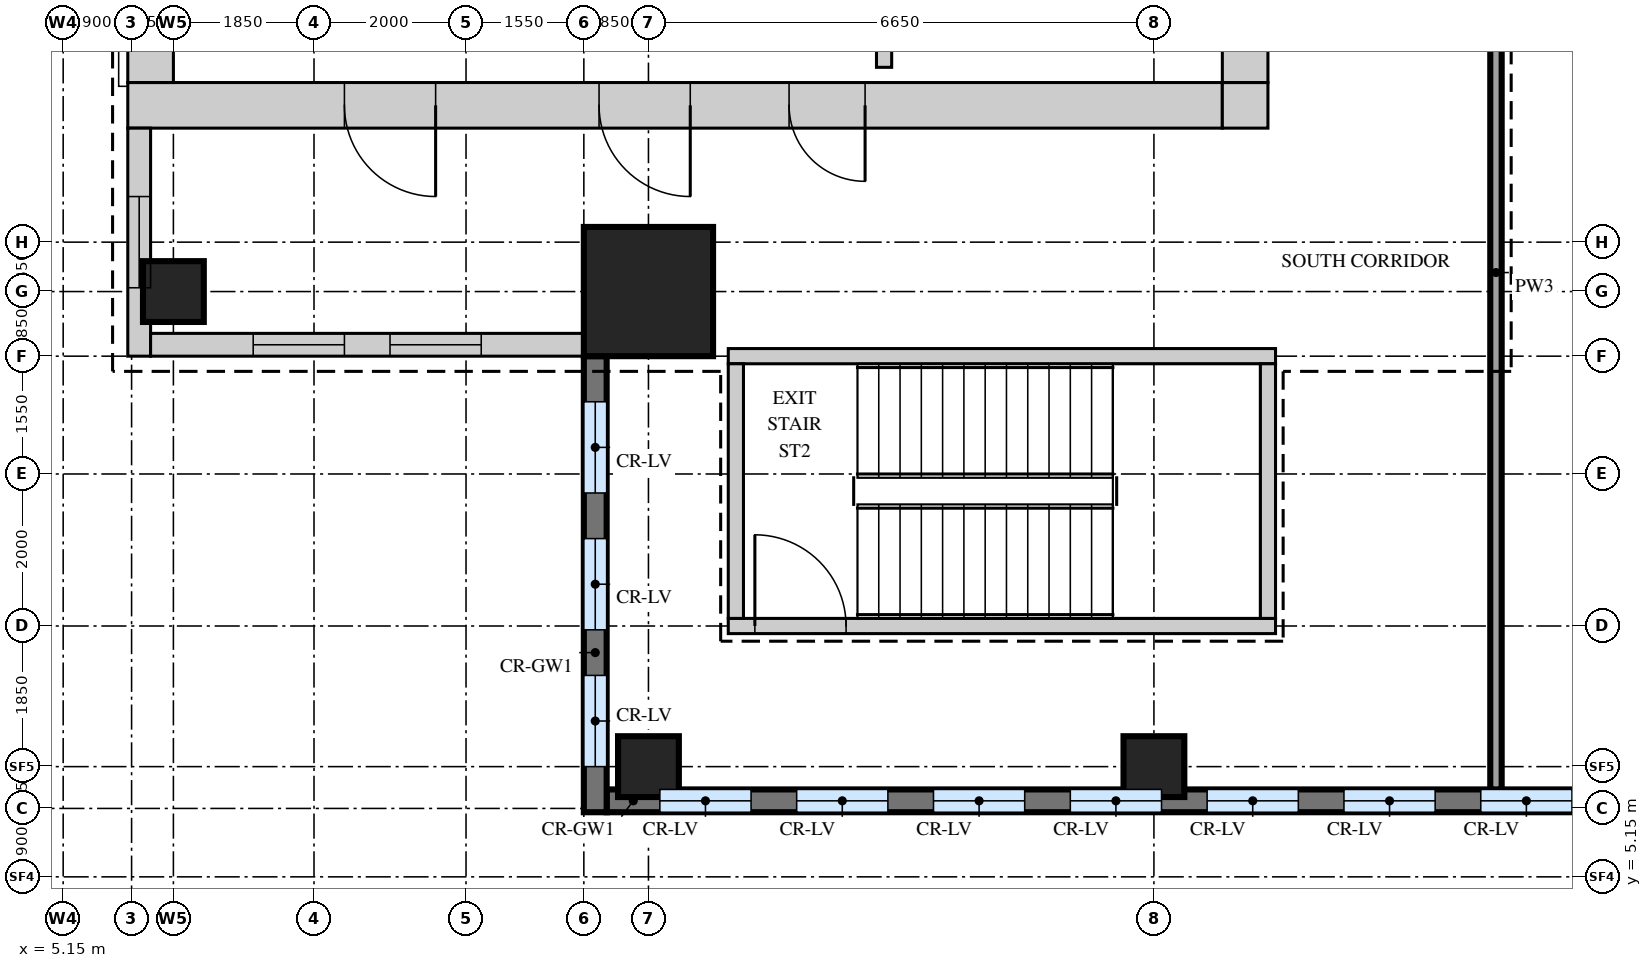
"""IFC4 building model, lengths in metres.
Left out: names, types, materials, properties, quantities, classifications, styles, units other than length and angle.
Written with IfcOpenShell. Run it as: python <this file> out.ifc"""

import sys

from ifc_helpers import new_model, si_unit, direction, frame, frame_2d, origin, origin_2d, place, context, subcontext, project, spatial, rectangle, extrude, source, transform, mapped, element, fill, save


model = new_model("IFC4")
c1 = context("Model", 3, precision=1e-05, world=origin(), true_north=direction((0.0, 1.0)))
c2 = subcontext(c1, "Body", "Model", "MODEL_VIEW")
j1 = project(units=[si_unit("LENGTHUNIT", "METRE"), si_unit("PLANEANGLEUNIT", "RADIAN")], contexts=[c1])
p1 = place(None, origin())
s1 = spatial("IfcSite", under=j1, at=p1, CompositionType="ELEMENT")
p2 = place(p1, origin())
s2 = spatial("IfcBuilding", under=s1, at=p2, CompositionType="ELEMENT")
p3 = place(p2, frame((0.0, 0.0, 348.2)))
s3 = spatial("IfcBuildingStorey", under=s2, at=p3, CompositionType="ELEMENT", Elevation=348.2)
m1 = source(origin(), c2, "Body", "SweptSolid", [
    extrude(rectangle(XDim=14.4, YDim=0.6, at=frame_2d((7.2, 0.0))), origin(), (0.0, 0.0, 1.0), 4.25),
])
p4 = place(p3, frame((6.0, 15.3, 0.0), z_axis=(0.0, 0.0, 1.0), x_axis=(1.0, 0.0, 0.0)))
e1 = element("IfcWall", 1, at=p4, inside=s3, PredefinedType="SHEAR", context=c2, shape_type="MappedRepresentation", body=[
    mapped(m1, transform((0.0, 0.0, 0.0))),
])
m2 = source(origin(), c2, "Body", "SweptSolid", [
    extrude(rectangle(XDim=1.2, YDim=2.1, at=frame_2d((0.6, 1.05))), frame((0.0, 0.31, 0.0), z_axis=(0.0, -1.0, 0.0), x_axis=(1.0, 0.0, 0.0)), (0.0, 0.0, 1.0), 0.62),
])
p5 = place(p4, frame((6.2, 0.0, 0.0)))
e2 = element("IfcOpeningElement", 2, at=p5, cuts=e1, PredefinedType="OPENING", context=c2, shape_type="MappedRepresentation", body=[
    mapped(m2, transform((0.0, 0.0, 0.0))),
])
p6 = place(p4, frame((2.85, 0.0, 0.0)))
e3 = element("IfcOpeningElement", 3, at=p6, cuts=e1, PredefinedType="OPENING", context=c2, shape_type="MappedRepresentation", body=[
    mapped(m2, transform((0.0, 0.0, 0.0))),
])
m3 = source(origin(), c2, "Body", "SweptSolid", [
    extrude(rectangle(XDim=1.0, YDim=2.1, at=frame_2d((0.5, 1.05))), frame((0.0, 0.31, 0.0), z_axis=(0.0, -1.0, 0.0), x_axis=(1.0, 0.0, 0.0)), (0.0, 0.0, 1.0), 0.62),
])
p7 = place(p4, frame((8.7, 0.0, 0.0)))
e4 = element("IfcOpeningElement", 4, at=p7, cuts=e1, PredefinedType="OPENING", context=c2, shape_type="MappedRepresentation", body=[
    mapped(m3, transform((0.0, 0.0, 0.0))),
])
m4 = source(origin(), c2, "Body", "SweptSolid", [
    extrude(rectangle(XDim=0.6, YDim=0.6, at=frame_2d((0.3, 0.0))), origin(), (0.0, 0.0, 1.0), 4.25),
])
p8 = place(p3, frame((20.4, 15.3, 0.0), z_axis=(0.0, 0.0, 1.0), x_axis=(1.0, 0.0, 0.0)))
e5 = element("IfcWall", 5, at=p8, inside=s3, PredefinedType="SHEAR", context=c2, shape_type="MappedRepresentation", body=[
    mapped(m4, transform((0.0, 0.0, 0.0))),
])
m5 = source(origin(), c2, "Body", "SweptSolid", [
    extrude(rectangle(XDim=22.8, YDim=0.6, at=frame_2d((11.4, 0.0))), origin(), (0.0, 0.0, 1.0), 4.25),
])
p9 = place(p3, frame((20.7, 15.6, 0.0), z_axis=(0.0, 0.0, 1.0), x_axis=(0.0, 1.0, 0.0)))
e6 = element("IfcWall", 6, at=p9, inside=s3, PredefinedType="SHEAR", context=c2, shape_type="MappedRepresentation", body=[
    mapped(m5, transform((0.0, 0.0, 0.0))),
])
m6 = source(origin(), c2, "Body", "SweptSolid", [
    extrude(rectangle(XDim=0.9, YDim=2.1, at=frame_2d((0.45, 1.05))), frame((0.0, 0.31, 0.0), z_axis=(0.0, -1.0, 0.0), x_axis=(1.0, 0.0, 0.0)), (0.0, 0.0, 1.0), 0.62),
])
p10 = place(p9, frame((8.2, 0.0, 0.0)))
e7 = element("IfcOpeningElement", 7, at=p10, cuts=e6, PredefinedType="OPENING", context=c2, shape_type="MappedRepresentation", body=[
    mapped(m6, transform((0.0, 0.0, 0.0))),
])
p11 = place(p9, frame((11.35, 0.0, 0.0)))
e8 = element("IfcOpeningElement", 8, at=p11, cuts=e6, PredefinedType="OPENING", context=c2, shape_type="MappedRepresentation", body=[
    mapped(m6, transform((0.0, 0.0, 0.0))),
])
p12 = place(p9, frame((14.65, 0.0, 0.0)))
e9 = element("IfcOpeningElement", 9, at=p12, cuts=e6, PredefinedType="OPENING", context=c2, shape_type="MappedRepresentation", body=[
    mapped(m6, transform((0.0, 0.0, 0.0))),
])
p13 = place(p9, frame((1.55, 0.0, 0.0)))
e10 = element("IfcOpeningElement", 10, at=p13, cuts=e6, PredefinedType="OPENING", context=c2, shape_type="MappedRepresentation", body=[
    mapped(m6, transform((0.0, 0.0, 0.0))),
])
p14 = place(p9, frame((5.1, 0.0, 0.0)))
e11 = element("IfcOpeningElement", 11, at=p14, cuts=e6, PredefinedType="OPENING", context=c2, shape_type="MappedRepresentation", body=[
    mapped(m6, transform((0.0, 0.0, 0.0))),
])
p15 = place(p3, frame((6.3, 15.6, 0.0), z_axis=(0.0, 0.0, 1.0), x_axis=(0.0, 1.0, 0.0)))
e12 = element("IfcWall", 12, at=p15, inside=s3, PredefinedType="SHEAR", context=c2, shape_type="MappedRepresentation", body=[
    mapped(m5, transform((0.0, 0.0, 0.0))),
])
m7 = source(origin(), c2, "Body", "SweptSolid", [
    extrude(rectangle(XDim=7.2, YDim=0.2, at=frame_2d((3.6, 0.0))), origin(), (0.0, 0.0, 1.0), 4.25),
])
p16 = place(p3, frame((13.9, 12.0, 0.0), z_axis=(0.0, 0.0, 1.0), x_axis=(1.0, 0.0, 0.0)))
e13 = element("IfcWall", 13, at=p16, inside=s3, PredefinedType="SHEAR", context=c2, shape_type="MappedRepresentation", body=[
    mapped(m7, transform((0.0, 0.0, 0.0))),
])
p17 = place(p3, frame((13.9, 8.45, 0.0), z_axis=(0.0, 0.0, 1.0), x_axis=(1.0, 0.0, 0.0)))
e14 = element("IfcWall", 14, at=p17, inside=s3, PredefinedType="SHEAR", context=c2, shape_type="MappedRepresentation", body=[
    mapped(m7, transform((0.0, 0.0, 0.0))),
])
m8 = source(origin(), c2, "Body", "SweptSolid", [
    extrude(rectangle(XDim=1.2, YDim=2.1, at=frame_2d((0.6, 1.05))), frame((0.0, 0.11, 0.0), z_axis=(0.0, -1.0, 0.0), x_axis=(1.0, 0.0, 0.0)), (0.0, 0.0, 1.0), 0.22),
])
p18 = place(p17, frame((0.35, 0.0, 0.0)))
e15 = element("IfcOpeningElement", 15, at=p18, cuts=e14, PredefinedType="OPENING", context=c2, shape_type="MappedRepresentation", body=[
    mapped(m8, transform((0.0, 0.0, 0.0))),
])
m9 = source(origin(), c2, "Body", "SweptSolid", [
    extrude(rectangle(XDim=3.35, YDim=0.2, at=frame_2d((1.675, 0.0))), origin(), (0.0, 0.0, 1.0), 4.25),
])
for number, where, z_axis, x_axis in (
    (16, (21.0, 8.55, 0.0), (0.0, 0.0, 1.0), (0.0, 1.0, 0.0)),
    (17, (14.0, 8.55, 0.0), (0.0, 0.0, 1.0), (0.0, 1.0, 0.0)),
):
    element("IfcWall", number, at=place(p3, frame(where, z_axis=z_axis, x_axis=x_axis)), inside=s3, PredefinedType="SHEAR", context=c2, shape_type="MappedRepresentation", body=[
        mapped(m9, transform((0.0, 0.0, 0.0))),
    ])
m10 = source(origin(), c2, "Body", "SweptSolid", [
    extrude(rectangle(XDim=1.7, YDim=1.7, at=origin_2d()), origin(), (0.0, 0.0, 1.0), 4.5),
])
p19 = place(p3, frame((12.85, 12.85, 0.0), z_axis=(0.0, 0.0, 1.0), x_axis=(1.0, 0.0, 0.0)))
e18 = element("IfcColumn", 18, at=p19, inside=s3, PredefinedType="COLUMN", context=c2, shape_type="MappedRepresentation", body=[
    mapped(m10, transform((0.0, 0.0, 0.0))),
])
m11 = source(origin(), c2, "Body", "SweptSolid", [
    extrude(rectangle(XDim=0.8, YDim=0.8, at=origin_2d()), origin(), (0.0, 0.0, 1.0), 4.5),
])
for number, where, z_axis, x_axis in (
    (19, (12.85, 6.6, 0.0), (0.0, 0.0, 1.0), (1.0, 0.0, 0.0)),
    (20, (19.5, 6.6, 0.0), (0.0, 0.0, 1.0), (1.0, 0.0, 0.0)),
    (21, (6.6, 12.85, 0.0), (0.0, 0.0, 1.0), (1.0, 0.0, 0.0)),
):
    element("IfcColumn", number, at=place(p3, frame(where, z_axis=z_axis, x_axis=x_axis)), inside=s3, PredefinedType="COLUMN", context=c2, shape_type="MappedRepresentation", body=[
        mapped(m11, transform((0.0, 0.0, 0.0))),
    ])
m12 = source(origin(), c2, "Body", "SweptSolid", [
    extrude(rectangle(XDim=13.394, YDim=0.3, at=frame_2d((6.697, 0.0))), origin(), (0.0, 0.0, 1.0), 4.5),
])
p20 = place(p3, frame((12.3, 6.15, 0.0), z_axis=(0.0, 0.0, 1.0), x_axis=(1.0, 0.0, 0.0)))
e22 = element("IfcWall", 22, at=p20, inside=s3, PredefinedType="SOLIDWALL", context=c2, shape_type="MappedRepresentation", body=[
    mapped(m12, transform((0.0, 0.0, 0.0))),
])
m13 = source(origin(), c2, "Body", "SweptSolid", [
    extrude(rectangle(XDim=1.2, YDim=2.4, at=frame_2d((0.6, 1.2))), frame((0.0, 0.16, 0.0), z_axis=(0.0, -1.0, 0.0), x_axis=(1.0, 0.0, 0.0)), (0.0, 0.0, 1.0), 0.32),
])
p21 = place(p20, frame((0.7, 0.0, 0.9)))
e23 = element("IfcOpeningElement", 23, at=p21, cuts=e22, PredefinedType="OPENING", context=c2, shape_type="MappedRepresentation", body=[
    mapped(m13, transform((0.0, 0.0, 0.0))),
])
p22 = place(p20, frame((2.5, 0.0, 0.9)))
e24 = element("IfcOpeningElement", 24, at=p22, cuts=e22, PredefinedType="OPENING", context=c2, shape_type="MappedRepresentation", body=[
    mapped(m13, transform((0.0, 0.0, 0.0))),
])
p23 = place(p20, frame((4.3, 0.0, 0.9)))
e25 = element("IfcOpeningElement", 25, at=p23, cuts=e22, PredefinedType="OPENING", context=c2, shape_type="MappedRepresentation", body=[
    mapped(m13, transform((0.0, 0.0, 0.0))),
])
p24 = place(p20, frame((6.1, 0.0, 0.9)))
e26 = element("IfcOpeningElement", 26, at=p24, cuts=e22, PredefinedType="OPENING", context=c2, shape_type="MappedRepresentation", body=[
    mapped(m13, transform((0.0, 0.0, 0.0))),
])
p25 = place(p20, frame((7.9, 0.0, 0.9)))
e27 = element("IfcOpeningElement", 27, at=p25, cuts=e22, PredefinedType="OPENING", context=c2, shape_type="MappedRepresentation", body=[
    mapped(m13, transform((0.0, 0.0, 0.0))),
])
p26 = place(p20, frame((9.7, 0.0, 0.9)))
e28 = element("IfcOpeningElement", 28, at=p26, cuts=e22, PredefinedType="OPENING", context=c2, shape_type="MappedRepresentation", body=[
    mapped(m13, transform((0.0, 0.0, 0.0))),
])
p27 = place(p20, frame((11.5, 0.0, 0.9)))
e29 = element("IfcOpeningElement", 29, at=p27, cuts=e22, PredefinedType="OPENING", context=c2, shape_type="MappedRepresentation", body=[
    mapped(m13, transform((0.0, 0.0, 0.0))),
])
m14 = source(origin(), c2, "Body", "SweptSolid", [
    extrude(rectangle(XDim=3.0, YDim=0.3, at=frame_2d((1.5, 0.0))), origin(), (0.0, 0.0, 1.0), 4.5),
])
p28 = place(p3, frame((6.15, 15.0, 0.0), z_axis=(0.0, 0.0, 1.0), x_axis=(0.0, -1.0, 0.0)))
e30 = element("IfcWall", 30, at=p28, inside=s3, PredefinedType="SOLIDWALL", context=c2, shape_type="MappedRepresentation", body=[
    mapped(m14, transform((0.0, 0.0, 0.0))),
])
p29 = place(p28, frame((0.9, 0.0, 0.9)))
e31 = element("IfcOpeningElement", 31, at=p29, cuts=e30, PredefinedType="OPENING", context=c2, shape_type="MappedRepresentation", body=[
    mapped(m13, transform((0.0, 0.0, 0.0))),
])
m15 = source(origin(), c2, "Body", "SweptSolid", [
    extrude(rectangle(XDim=5.7, YDim=0.3, at=frame_2d((2.85, 0.0))), origin(), (0.0, 0.0, 1.0), 4.5),
])
p30 = place(p3, frame((6.3, 12.15, 0.0), z_axis=(0.0, 0.0, 1.0), x_axis=(1.0, 0.0, 0.0)))
e32 = element("IfcWall", 32, at=p30, inside=s3, PredefinedType="SOLIDWALL", context=c2, shape_type="MappedRepresentation", body=[
    mapped(m15, transform((0.0, 0.0, 0.0))),
])
p31 = place(p30, frame((1.35, 0.0, 0.9)))
e33 = element("IfcOpeningElement", 33, at=p31, cuts=e32, PredefinedType="OPENING", context=c2, shape_type="MappedRepresentation", body=[
    mapped(m13, transform((0.0, 0.0, 0.0))),
])
p32 = place(p30, frame((3.15, 0.0, 0.9)))
e34 = element("IfcOpeningElement", 34, at=p32, cuts=e32, PredefinedType="OPENING", context=c2, shape_type="MappedRepresentation", body=[
    mapped(m13, transform((0.0, 0.0, 0.0))),
])
m16 = source(origin(), c2, "Body", "SweptSolid", [
    extrude(rectangle(XDim=6.0, YDim=0.3, at=frame_2d((3.0, 0.0))), origin(), (0.0, 0.0, 1.0), 4.5),
])
p33 = place(p3, frame((12.15, 12.0, 0.0), z_axis=(0.0, 0.0, 1.0), x_axis=(0.0, -1.0, 0.0)))
e35 = element("IfcWall", 35, at=p33, inside=s3, PredefinedType="SOLIDWALL", context=c2, shape_type="MappedRepresentation", body=[
    mapped(m16, transform((0.0, 0.0, 0.0))),
])
p34 = place(p33, frame((0.6, 0.0, 0.9)))
e36 = element("IfcOpeningElement", 36, at=p34, cuts=e35, PredefinedType="OPENING", context=c2, shape_type="MappedRepresentation", body=[
    mapped(m13, transform((0.0, 0.0, 0.0))),
])
p35 = place(p33, frame((2.4, 0.0, 0.9)))
e37 = element("IfcOpeningElement", 37, at=p35, cuts=e35, PredefinedType="OPENING", context=c2, shape_type="MappedRepresentation", body=[
    mapped(m13, transform((0.0, 0.0, 0.0))),
])
p36 = place(p33, frame((4.2, 0.0, 0.9)))
e38 = element("IfcOpeningElement", 38, at=p36, cuts=e35, PredefinedType="OPENING", context=c2, shape_type="MappedRepresentation", body=[
    mapped(m13, transform((0.0, 0.0, 0.0))),
])
m17 = source(origin(), c2, "Body", "SweptSolid", [
    extrude(rectangle(XDim=32.6, YDim=0.15, at=frame_2d((16.3, 0.0))), origin(), (0.0, 0.0, 1.0), 4.3),
])
p37 = place(p3, frame((24.0, 6.3, 0.0), z_axis=(0.0, 0.0, 1.0), x_axis=(0.0, 1.0, 0.0)))
e39 = element("IfcWall", 39, at=p37, inside=s3, PredefinedType="PARTITIONING", context=c2, shape_type="MappedRepresentation", body=[
    mapped(m17, transform((0.0, 0.0, 0.0))),
])
m18 = source(origin(), c2, "Body", "SweptSolid", [
    extrude(rectangle(XDim=0.9, YDim=2.1, at=frame_2d((0.45, 1.05))), frame((0.0, 0.085, 0.0), z_axis=(0.0, -1.0, 0.0), x_axis=(1.0, 0.0, 0.0)), (0.0, 0.0, 1.0), 0.17),
])
p38 = place(p37, frame((13.6, 0.0, 0.0)))
e40 = element("IfcOpeningElement", 40, at=p38, cuts=e39, PredefinedType="OPENING", context=c2, shape_type="MappedRepresentation", body=[
    mapped(m18, transform((0.0, 0.0, 0.0))),
])
p39 = place(p37, frame((25.9, 0.0, 0.0)))
e41 = element("IfcOpeningElement", 41, at=p39, cuts=e39, PredefinedType="OPENING", context=c2, shape_type="MappedRepresentation", body=[
    mapped(m18, transform((0.0, 0.0, 0.0))),
])
m19 = source(origin(), c2, "Body", "SweptSolid", [
    extrude(rectangle(XDim=3.4, YDim=0.2, at=frame_2d((1.7, 0.0))), origin(), (0.0, 0.0, 1.0), 4.3),
])
p40 = place(p3, frame((15.95, 15.8, 0.0), z_axis=(0.0, 0.0, 1.0), x_axis=(0.0, 1.0, 0.0)))
e42 = element("IfcWall", 42, at=p40, inside=s3, PredefinedType="PARTITIONING", context=c2, shape_type="MappedRepresentation", body=[
    mapped(m19, transform((0.0, 0.0, 0.0))),
])
m20 = source(origin(), c2, "Body", "SweptSolid", [
    extrude(rectangle(XDim=1.2, YDim=2.4, at=frame_2d((0.6, 1.2))), frame((0.0, 0.03, 0.0), z_axis=(0.0, -1.0, 0.0), x_axis=(1.0, 0.0, 0.0)), (0.0, 0.0, 1.0), 0.06),
])
p41 = place(p21, origin())
e43 = element("IfcWindow", 43, at=p41, inside=s3, PartitioningType="SINGLE_PANEL", PredefinedType="WINDOW", context=c2, shape_type="MappedRepresentation", body=[
    mapped(m20, transform((0.0, 0.0, 0.0))),
])
fill(e23, e43)
p42 = place(p22, origin())
e44 = element("IfcWindow", 44, at=p42, inside=s3, PartitioningType="SINGLE_PANEL", PredefinedType="WINDOW", context=c2, shape_type="MappedRepresentation", body=[
    mapped(m20, transform((0.0, 0.0, 0.0))),
])
fill(e24, e44)
p43 = place(p23, origin())
e45 = element("IfcWindow", 45, at=p43, inside=s3, PartitioningType="SINGLE_PANEL", PredefinedType="WINDOW", context=c2, shape_type="MappedRepresentation", body=[
    mapped(m20, transform((0.0, 0.0, 0.0))),
])
fill(e25, e45)
p44 = place(p24, origin())
e46 = element("IfcWindow", 46, at=p44, inside=s3, PartitioningType="SINGLE_PANEL", PredefinedType="WINDOW", context=c2, shape_type="MappedRepresentation", body=[
    mapped(m20, transform((0.0, 0.0, 0.0))),
])
fill(e26, e46)
p45 = place(p25, origin())
e47 = element("IfcWindow", 47, at=p45, inside=s3, PartitioningType="SINGLE_PANEL", PredefinedType="WINDOW", context=c2, shape_type="MappedRepresentation", body=[
    mapped(m20, transform((0.0, 0.0, 0.0))),
])
fill(e27, e47)
p46 = place(p26, origin())
e48 = element("IfcWindow", 48, at=p46, inside=s3, PartitioningType="SINGLE_PANEL", PredefinedType="WINDOW", context=c2, shape_type="MappedRepresentation", body=[
    mapped(m20, transform((0.0, 0.0, 0.0))),
])
fill(e28, e48)
p47 = place(p27, origin())
e49 = element("IfcWindow", 49, at=p47, inside=s3, PartitioningType="SINGLE_PANEL", PredefinedType="WINDOW", context=c2, shape_type="MappedRepresentation", body=[
    mapped(m20, transform((0.0, 0.0, 0.0))),
])
fill(e29, e49)
p48 = place(p29, origin())
e50 = element("IfcWindow", 50, at=p48, inside=s3, PartitioningType="SINGLE_PANEL", PredefinedType="WINDOW", context=c2, shape_type="MappedRepresentation", body=[
    mapped(m20, transform((0.0, 0.0, 0.0))),
])
fill(e31, e50)
p49 = place(p31, origin())
e51 = element("IfcWindow", 51, at=p49, inside=s3, PartitioningType="SINGLE_PANEL", PredefinedType="WINDOW", context=c2, shape_type="MappedRepresentation", body=[
    mapped(m20, transform((0.0, 0.0, 0.0))),
])
fill(e33, e51)
p50 = place(p32, origin())
e52 = element("IfcWindow", 52, at=p50, inside=s3, PartitioningType="SINGLE_PANEL", PredefinedType="WINDOW", context=c2, shape_type="MappedRepresentation", body=[
    mapped(m20, transform((0.0, 0.0, 0.0))),
])
fill(e34, e52)
p51 = place(p34, origin())
e53 = element("IfcWindow", 53, at=p51, inside=s3, PartitioningType="SINGLE_PANEL", PredefinedType="WINDOW", context=c2, shape_type="MappedRepresentation", body=[
    mapped(m20, transform((0.0, 0.0, 0.0))),
])
fill(e36, e53)
p52 = place(p35, origin())
e54 = element("IfcWindow", 54, at=p52, inside=s3, PartitioningType="SINGLE_PANEL", PredefinedType="WINDOW", context=c2, shape_type="MappedRepresentation", body=[
    mapped(m20, transform((0.0, 0.0, 0.0))),
])
fill(e37, e54)
p53 = place(p36, origin())
e55 = element("IfcWindow", 55, at=p53, inside=s3, PartitioningType="SINGLE_PANEL", PredefinedType="WINDOW", context=c2, shape_type="MappedRepresentation", body=[
    mapped(m20, transform((0.0, 0.0, 0.0))),
])
fill(e38, e55)
m21 = source(origin(), c2, "Body", "SweptSolid", [
    extrude(rectangle(XDim=1.2, YDim=2.1, at=frame_2d((0.6, 1.05))), frame((0.0, 0.25, 0.0), z_axis=(0.0, -1.0, 0.0), x_axis=(1.0, 0.0, 0.0)), (0.0, 0.0, 1.0), 0.5),
])
p54 = place(p5, origin())
e56 = element("IfcDoor", 56, at=p54, inside=s3, OperationType="SINGLE_SWING_RIGHT", PredefinedType="DOOR", context=c2, shape_type="MappedRepresentation", body=[
    mapped(m21, transform((0.0, 0.0, 0.0))),
])
fill(e2, e56)
p55 = place(p6, origin())
e57 = element("IfcDoor", 57, at=p55, inside=s3, OperationType="SINGLE_SWING_RIGHT", PredefinedType="DOOR", context=c2, shape_type="MappedRepresentation", body=[
    mapped(m21, transform((0.0, 0.0, 0.0))),
])
fill(e3, e57)
m22 = source(origin(), c2, "Body", "SweptSolid", [
    extrude(rectangle(XDim=1.0, YDim=2.1, at=frame_2d((0.5, 1.05))), frame((0.0, 0.25, 0.0), z_axis=(0.0, -1.0, 0.0), x_axis=(1.0, 0.0, 0.0)), (0.0, 0.0, 1.0), 0.5),
])
p56 = place(p7, origin())
e58 = element("IfcDoor", 58, at=p56, inside=s3, OperationType="SINGLE_SWING_RIGHT", PredefinedType="DOOR", context=c2, shape_type="MappedRepresentation", body=[
    mapped(m22, transform((0.0, 0.0, 0.0))),
])
fill(e4, e58)
m23 = source(origin(), c2, "Body", "SweptSolid", [
    extrude(rectangle(XDim=1.2, YDim=2.1, at=frame_2d((0.6, 1.05))), frame((0.0, 0.025, 0.0), z_axis=(0.0, -1.0, 0.0), x_axis=(1.0, 0.0, 0.0)), (0.0, 0.0, 1.0), 0.05),
])
p57 = place(p18, origin())
e59 = element("IfcDoor", 59, at=p57, inside=s3, OperationType="SINGLE_SWING_RIGHT", PredefinedType="DOOR", context=c2, shape_type="MappedRepresentation", body=[
    mapped(m23, transform((0.0, 0.0, 0.0))),
])
fill(e15, e59)
save(model, sys.argv[1])
